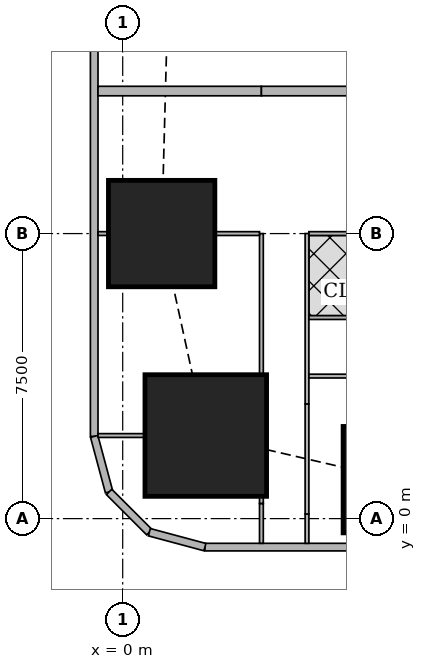
"""IFC4 building model, lengths in metres.
Left out: names, types, materials, properties, quantities, classifications, styles, units other than length and angle.
Written with IfcOpenShell. Run it as: python <this file> out.ifc"""

import sys

from ifc_helpers import new_model, si_unit, direction, frame, frame_2d, origin, origin_2d, place, context, subcontext, project, spatial, rectangle, extrude, element, fill, save


model = new_model("IFC4")
c1 = context("Model", 3, precision=1e-05, world=origin(), true_north=direction((0.0, 1.0)))
c2 = subcontext(c1, "Body", "Model", "MODEL_VIEW")
j1 = project(units=[si_unit("LENGTHUNIT", "METRE"), si_unit("PLANEANGLEUNIT", "RADIAN")], contexts=[c1])
p1 = place(None, origin())
s1 = spatial("IfcSite", under=j1, at=p1, CompositionType="ELEMENT")
p2 = place(p1, origin())
s2 = spatial("IfcBuilding", under=s1, at=p2, CompositionType="ELEMENT")
p3 = place(p2, frame((0.0, 0.0, 53.75)))
s3 = spatial("IfcBuildingStorey", under=s2, at=p3, CompositionType="ELEMENT", Elevation=53.75)
p4 = place(p3, frame((7.2, 1.025, 0.0), z_axis=(0.0, 0.0, 1.0), x_axis=(1.0, 0.0, 0.0)))
e1 = element("IfcColumn", 1, at=p4, inside=s3, PredefinedType="COLUMN", context=c2, shape_type="SweptSolid", body=[
    extrude(rectangle(XDim=2.8, YDim=2.8, at=origin_2d()), origin(), (0.0, 0.0, 1.0), 3.75),
])
p5 = place(p3, frame((2.186, 2.186, 0.0), z_axis=(0.0, 0.0, 1.0), x_axis=(1.0, 0.0, 0.0)))
e2 = element("IfcColumn", 2, at=p5, inside=s3, PredefinedType="COLUMN", context=c2, shape_type="SweptSolid", body=[
    extrude(rectangle(XDim=3.2, YDim=3.2, at=origin_2d()), origin(), (0.0, 0.0, 1.0), 3.75),
])
p6 = place(p3, frame((1.025, 7.5, 0.0), z_axis=(0.0, 0.0, 1.0), x_axis=(1.0, 0.0, 0.0)))
e3 = element("IfcColumn", 3, at=p6, inside=s3, PredefinedType="COLUMN", context=c2, shape_type="SweptSolid", body=[
    extrude(rectangle(XDim=2.8, YDim=2.8, at=origin_2d()), origin(), (0.0, 0.0, 1.0), 3.75),
])
p7 = place(p3, frame((2.163, -0.75, 0.0), z_axis=(0.0, 0.0, 1.0), x_axis=(1.0, 0.0, 0.0)))
e4 = element("IfcWall", 4, at=p7, inside=s3, PredefinedType="SOLIDWALL", context=c2, shape_type="SweptSolid", body=[
    extrude(rectangle(XDim=45.628, YDim=0.2, at=frame_2d((22.814, 0.0))), origin(), (0.0, 0.0, 1.0), 3.5),
])
p8 = place(p7, frame((9.537, 0.0, 0.9)))
e5 = element("IfcOpeningElement", 5, at=p8, cuts=e4, PredefinedType="OPENING", context=c2, shape_type="SweptSolid", body=[
    extrude(rectangle(XDim=1.8, YDim=1.5, at=frame_2d((0.9, 0.75))), frame((0.0, 0.11, 0.0), z_axis=(0.0, -1.0, 0.0), x_axis=(1.0, 0.0, 0.0)), (0.0, 0.0, 1.0), 0.22),
])
p9 = place(p7, frame((13.137, 0.0, 0.9)))
e6 = element("IfcOpeningElement", 6, at=p9, cuts=e4, PredefinedType="OPENING", context=c2, shape_type="SweptSolid", body=[
    extrude(rectangle(XDim=1.8, YDim=1.5, at=frame_2d((0.9, 0.75))), frame((0.0, 0.11, 0.0), z_axis=(0.0, -1.0, 0.0), x_axis=(1.0, 0.0, 0.0)), (0.0, 0.0, 1.0), 0.22),
])
p10 = place(p7, frame((16.737, 0.0, 0.9)))
e7 = element("IfcOpeningElement", 7, at=p10, cuts=e4, PredefinedType="OPENING", context=c2, shape_type="SweptSolid", body=[
    extrude(rectangle(XDim=1.8, YDim=1.5, at=frame_2d((0.9, 0.75))), frame((0.0, 0.11, 0.0), z_axis=(0.0, -1.0, 0.0), x_axis=(1.0, 0.0, 0.0)), (0.0, 0.0, 1.0), 0.22),
])
p11 = place(p7, frame((20.337, 0.0, 0.9)))
e8 = element("IfcOpeningElement", 8, at=p11, cuts=e4, PredefinedType="OPENING", context=c2, shape_type="SweptSolid", body=[
    extrude(rectangle(XDim=1.8, YDim=1.5, at=frame_2d((0.9, 0.75))), frame((0.0, 0.11, 0.0), z_axis=(0.0, -1.0, 0.0), x_axis=(1.0, 0.0, 0.0)), (0.0, 0.0, 1.0), 0.22),
])
p12 = place(p7, frame((23.937, 0.0, 0.9)))
e9 = element("IfcOpeningElement", 9, at=p12, cuts=e4, PredefinedType="OPENING", context=c2, shape_type="SweptSolid", body=[
    extrude(rectangle(XDim=1.8, YDim=1.5, at=frame_2d((0.9, 0.75))), frame((0.0, 0.11, 0.0), z_axis=(0.0, -1.0, 0.0), x_axis=(1.0, 0.0, 0.0)), (0.0, 0.0, 1.0), 0.22),
])
p13 = place(p7, frame((27.537, 0.0, 0.9)))
e10 = element("IfcOpeningElement", 10, at=p13, cuts=e4, PredefinedType="OPENING", context=c2, shape_type="SweptSolid", body=[
    extrude(rectangle(XDim=1.8, YDim=1.5, at=frame_2d((0.9, 0.75))), frame((0.0, 0.11, 0.0), z_axis=(0.0, -1.0, 0.0), x_axis=(1.0, 0.0, 0.0)), (0.0, 0.0, 1.0), 0.22),
])
p14 = place(p7, frame((31.137, 0.0, 0.9)))
e11 = element("IfcOpeningElement", 11, at=p14, cuts=e4, PredefinedType="OPENING", context=c2, shape_type="SweptSolid", body=[
    extrude(rectangle(XDim=1.8, YDim=1.5, at=frame_2d((0.9, 0.75))), frame((0.0, 0.11, 0.0), z_axis=(0.0, -1.0, 0.0), x_axis=(1.0, 0.0, 0.0)), (0.0, 0.0, 1.0), 0.22),
])
p15 = place(p7, frame((34.737, 0.0, 0.9)))
e12 = element("IfcOpeningElement", 12, at=p15, cuts=e4, PredefinedType="OPENING", context=c2, shape_type="SweptSolid", body=[
    extrude(rectangle(XDim=1.8, YDim=1.5, at=frame_2d((0.9, 0.75))), frame((0.0, 0.11, 0.0), z_axis=(0.0, -1.0, 0.0), x_axis=(1.0, 0.0, 0.0)), (0.0, 0.0, 1.0), 0.22),
])
p16 = place(p3, frame((-0.75, 42.837, 0.0), z_axis=(0.0, 0.0, 1.0), x_axis=(0.0, -1.0, 0.0)))
e13 = element("IfcWall", 13, at=p16, inside=s3, PredefinedType="SOLIDWALL", context=c2, shape_type="SweptSolid", body=[
    extrude(rectangle(XDim=40.674, YDim=0.2, at=frame_2d((20.337, 0.0))), origin(), (0.0, 0.0, 1.0), 3.5),
])
p17 = place(p16, frame((1.78, 0.0, 0.9)))
e14 = element("IfcOpeningElement", 14, at=p17, cuts=e13, PredefinedType="OPENING", context=c2, shape_type="SweptSolid", body=[
    extrude(rectangle(XDim=1.8, YDim=1.5, at=frame_2d((0.9, 0.75))), frame((0.0, 0.11, 0.0), z_axis=(0.0, -1.0, 0.0), x_axis=(1.0, 0.0, 0.0)), (0.0, 0.0, 1.0), 0.22),
])
p18 = place(p16, frame((6.312, 0.0, 0.9)))
e15 = element("IfcOpeningElement", 15, at=p18, cuts=e13, PredefinedType="OPENING", context=c2, shape_type="SweptSolid", body=[
    extrude(rectangle(XDim=1.8, YDim=1.5, at=frame_2d((0.9, 0.75))), frame((0.0, 0.11, 0.0), z_axis=(0.0, -1.0, 0.0), x_axis=(1.0, 0.0, 0.0)), (0.0, 0.0, 1.0), 0.22),
])
p19 = place(p16, frame((10.062, 0.0, 0.9)))
e16 = element("IfcOpeningElement", 16, at=p19, cuts=e13, PredefinedType="OPENING", context=c2, shape_type="SweptSolid", body=[
    extrude(rectangle(XDim=1.8, YDim=1.5, at=frame_2d((0.9, 0.75))), frame((0.0, 0.11, 0.0), z_axis=(0.0, -1.0, 0.0), x_axis=(1.0, 0.0, 0.0)), (0.0, 0.0, 1.0), 0.22),
])
p20 = place(p16, frame((13.812, 0.0, 0.9)))
e17 = element("IfcOpeningElement", 17, at=p20, cuts=e13, PredefinedType="OPENING", context=c2, shape_type="SweptSolid", body=[
    extrude(rectangle(XDim=1.8, YDim=1.5, at=frame_2d((0.9, 0.75))), frame((0.0, 0.11, 0.0), z_axis=(0.0, -1.0, 0.0), x_axis=(1.0, 0.0, 0.0)), (0.0, 0.0, 1.0), 0.22),
])
p21 = place(p16, frame((17.562, 0.0, 0.9)))
e18 = element("IfcOpeningElement", 18, at=p21, cuts=e13, PredefinedType="OPENING", context=c2, shape_type="SweptSolid", body=[
    extrude(rectangle(XDim=1.8, YDim=1.5, at=frame_2d((0.9, 0.75))), frame((0.0, 0.11, 0.0), z_axis=(0.0, -1.0, 0.0), x_axis=(1.0, 0.0, 0.0)), (0.0, 0.0, 1.0), 0.22),
])
p22 = place(p16, frame((21.312, 0.0, 0.9)))
e19 = element("IfcOpeningElement", 19, at=p22, cuts=e13, PredefinedType="OPENING", context=c2, shape_type="SweptSolid", body=[
    extrude(rectangle(XDim=1.8, YDim=1.5, at=frame_2d((0.9, 0.75))), frame((0.0, 0.11, 0.0), z_axis=(0.0, -1.0, 0.0), x_axis=(1.0, 0.0, 0.0)), (0.0, 0.0, 1.0), 0.22),
])
p23 = place(p16, frame((25.062, 0.0, 0.9)))
e20 = element("IfcOpeningElement", 20, at=p23, cuts=e13, PredefinedType="OPENING", context=c2, shape_type="SweptSolid", body=[
    extrude(rectangle(XDim=1.8, YDim=1.5, at=frame_2d((0.9, 0.75))), frame((0.0, 0.11, 0.0), z_axis=(0.0, -1.0, 0.0), x_axis=(1.0, 0.0, 0.0)), (0.0, 0.0, 1.0), 0.22),
])
p24 = place(p16, frame((28.812, 0.0, 0.9)))
e21 = element("IfcOpeningElement", 21, at=p24, cuts=e13, PredefinedType="OPENING", context=c2, shape_type="SweptSolid", body=[
    extrude(rectangle(XDim=1.8, YDim=1.5, at=frame_2d((0.9, 0.75))), frame((0.0, 0.11, 0.0), z_axis=(0.0, -1.0, 0.0), x_axis=(1.0, 0.0, 0.0)), (0.0, 0.0, 1.0), 0.22),
])
p25 = place(p16, frame((32.562, 0.0, 0.9)))
e22 = element("IfcOpeningElement", 22, at=p25, cuts=e13, PredefinedType="OPENING", context=c2, shape_type="SweptSolid", body=[
    extrude(rectangle(XDim=1.8, YDim=1.5, at=frame_2d((0.9, 0.75))), frame((0.0, 0.11, 0.0), z_axis=(0.0, -1.0, 0.0), x_axis=(1.0, 0.0, 0.0)), (0.0, 0.0, 1.0), 0.22),
])
p26 = place(p16, frame((37.094, 0.0, 0.9)))
e23 = element("IfcOpeningElement", 23, at=p26, cuts=e13, PredefinedType="OPENING", context=c2, shape_type="SweptSolid", body=[
    extrude(rectangle(XDim=1.8, YDim=1.5, at=frame_2d((0.9, 0.75))), frame((0.0, 0.11, 0.0), z_axis=(0.0, -1.0, 0.0), x_axis=(1.0, 0.0, 0.0)), (0.0, 0.0, 1.0), 0.22),
])
p27 = place(p3, frame((-0.75, 2.163, 0.0), z_axis=(0.0, 0.0, 1.0), x_axis=(0.259168954497, -0.965832000415, 0.0)))
e24 = element("IfcWall", 24, at=p27, inside=s3, PredefinedType="SOLIDWALL", context=c2, shape_type="SweptSolid", body=[
    extrude(rectangle(XDim=1.513, YDim=0.2, at=frame_2d((0.756, 0.0))), origin(), (0.0, 0.0, 1.0), 3.5),
])
p28 = place(p3, frame((-0.358, 0.702, 0.0), z_axis=(0.0, 0.0, 1.0), x_axis=(0.707106781187, -0.707106781187, 0.0)))
e25 = element("IfcWall", 25, at=p28, inside=s3, PredefinedType="SOLIDWALL", context=c2, shape_type="SweptSolid", body=[
    extrude(rectangle(XDim=1.499, YDim=0.2, at=frame_2d((0.75, 0.0))), origin(), (0.0, 0.0, 1.0), 3.5),
])
p29 = place(p3, frame((0.702, -0.358, 0.0), z_axis=(0.0, 0.0, 1.0), x_axis=(0.965832000415, -0.259168954497, 0.0)))
e26 = element("IfcWall", 26, at=p29, inside=s3, PredefinedType="SOLIDWALL", context=c2, shape_type="SweptSolid", body=[
    extrude(rectangle(XDim=1.513, YDim=0.2, at=frame_2d((0.756, 0.0))), origin(), (0.0, 0.0, 1.0), 3.5),
])
p30 = place(p3, frame((3.65, -0.65, 0.0), z_axis=(0.0, 0.0, 1.0), x_axis=(0.0, 1.0, 0.0)))
e27 = element("IfcWall", 27, at=p30, inside=s3, PredefinedType="PARTITIONING", context=c2, shape_type="SweptSolid", body=[
    extrude(rectangle(XDim=1.048, YDim=0.1, at=frame_2d((0.524, 0.0))), origin(), (0.0, 0.0, 1.0), 3.5),
])
p31 = place(p3, frame((3.65, 0.398, 0.0), z_axis=(0.0, 0.0, 1.0), x_axis=(0.0, 1.0, 0.0)))
e28 = element("IfcWall", 28, at=p31, inside=s3, PredefinedType="PARTITIONING", context=c2, shape_type="SweptSolid", body=[
    extrude(rectangle(XDim=0.187, YDim=0.1, at=frame_2d((0.094, 0.0))), origin(), (0.0, 0.0, 1.0), 2.05),
])
p32 = place(p3, frame((3.65, 3.787, 0.0), z_axis=(0.0, 0.0, 1.0), x_axis=(0.0, 1.0, 0.0)))
e29 = element("IfcWall", 29, at=p32, inside=s3, PredefinedType="PARTITIONING", context=c2, shape_type="SweptSolid", body=[
    extrude(rectangle(XDim=3.713, YDim=0.1, at=frame_2d((1.856, 0.0))), origin(), (0.0, 0.0, 1.0), 3.5),
])
p33 = place(p32, frame((1.4, 0.0, 0.0)))
e30 = element("IfcOpeningElement", 30, at=p33, cuts=e29, PredefinedType="OPENING", context=c2, shape_type="SweptSolid", body=[
    extrude(rectangle(XDim=0.9, YDim=2.1, at=frame_2d((0.45, 1.05))), frame((0.0, 0.06, 0.0), z_axis=(0.0, -1.0, 0.0), x_axis=(1.0, 0.0, 0.0)), (0.0, 0.0, 1.0), 0.12),
])
p34 = place(p3, frame((4.85, -0.65, 0.0), z_axis=(0.0, 0.0, 1.0), x_axis=(0.0, 1.0, 0.0)))
e31 = element("IfcWall", 31, at=p34, inside=s3, PredefinedType="PARTITIONING", context=c2, shape_type="SweptSolid", body=[
    extrude(rectangle(XDim=0.771, YDim=0.1, at=frame_2d((0.385, 0.0))), origin(), (0.0, 0.0, 1.0), 3.5),
])
p35 = place(p3, frame((4.85, 0.121, 0.0), z_axis=(0.0, 0.0, 1.0), x_axis=(0.0, 1.0, 0.0)))
e32 = element("IfcWall", 32, at=p35, inside=s3, PredefinedType="PARTITIONING", context=c2, shape_type="SweptSolid", body=[
    extrude(rectangle(XDim=2.897, YDim=0.1, at=frame_2d((1.448, 0.0))), origin(), (0.0, 0.0, 1.0), 2.05),
])
p36 = place(p3, frame((4.85, 3.018, 0.0), z_axis=(0.0, 0.0, 1.0), x_axis=(0.0, 1.0, 0.0)))
e33 = element("IfcWall", 33, at=p36, inside=s3, PredefinedType="PARTITIONING", context=c2, shape_type="SweptSolid", body=[
    extrude(rectangle(XDim=4.482, YDim=0.1, at=frame_2d((2.241, 0.0))), origin(), (0.0, 0.0, 1.0), 3.5),
])
p37 = place(p36, frame((2.927, 0.0, 0.0)))
e34 = element("IfcOpeningElement", 34, at=p37, cuts=e33, PredefinedType="OPENING", context=c2, shape_type="SweptSolid", body=[
    extrude(rectangle(XDim=0.9, YDim=2.1, at=frame_2d((0.45, 1.05))), frame((0.0, 0.06, 0.0), z_axis=(0.0, -1.0, 0.0), x_axis=(1.0, 0.0, 0.0)), (0.0, 0.0, 1.0), 0.12),
])
p38 = place(p36, frame((1.052, 0.0, 0.0)))
e35 = element("IfcOpeningElement", 35, at=p38, cuts=e33, PredefinedType="OPENING", context=c2, shape_type="SweptSolid", body=[
    extrude(rectangle(XDim=0.9, YDim=2.1, at=frame_2d((0.45, 1.05))), frame((0.0, 0.06, 0.0), z_axis=(0.0, -1.0, 0.0), x_axis=(1.0, 0.0, 0.0)), (0.0, 0.0, 1.0), 0.12),
])
p39 = place(p3, frame((-0.65, 2.186, 0.0), z_axis=(0.0, 0.0, 1.0), x_axis=(1.0, 0.0, 0.0)))
e36 = element("IfcWall", 36, at=p39, inside=s3, PredefinedType="PARTITIONING", context=c2, shape_type="SweptSolid", body=[
    extrude(rectangle(XDim=1.235, YDim=0.1, at=frame_2d((0.617, 0.0))), origin(), (0.0, 0.0, 1.0), 3.5),
])
p40 = place(p3, frame((-0.65, 7.5, 0.0), z_axis=(0.0, 0.0, 1.0), x_axis=(1.0, 0.0, 0.0)))
e37 = element("IfcWall", 37, at=p40, inside=s3, PredefinedType="PARTITIONING", context=c2, shape_type="SweptSolid", body=[
    extrude(rectangle(XDim=0.274, YDim=0.1, at=frame_2d((0.137, 0.0))), origin(), (0.0, 0.0, 1.0), 3.5),
])
p41 = place(p3, frame((2.426, 7.5, 0.0), z_axis=(0.0, 0.0, 1.0), x_axis=(1.0, 0.0, 0.0)))
e38 = element("IfcWall", 38, at=p41, inside=s3, PredefinedType="PARTITIONING", context=c2, shape_type="SweptSolid", body=[
    extrude(rectangle(XDim=1.174, YDim=0.1, at=frame_2d((0.587, 0.0))), origin(), (0.0, 0.0, 1.0), 2.05),
])
p42 = place(p3, frame((4.9, 3.75, 0.0), z_axis=(0.0, 0.0, 1.0), x_axis=(1.0, 0.0, 0.0)))
e39 = element("IfcWall", 39, at=p42, inside=s3, PredefinedType="PARTITIONING", context=c2, shape_type="SweptSolid", body=[
    extrude(rectangle(XDim=3.275, YDim=0.1, at=frame_2d((1.638, 0.0))), origin(), (0.0, 0.0, 1.0), 3.5),
])
p43 = place(p3, frame((4.9, 7.5, 0.0), z_axis=(0.0, 0.0, 1.0), x_axis=(1.0, 0.0, 0.0)))
e40 = element("IfcWall", 40, at=p43, inside=s3, PredefinedType="PARTITIONING", context=c2, shape_type="SweptSolid", body=[
    extrude(rectangle(XDim=1.399, YDim=0.1, at=frame_2d((0.7, 0.0))), origin(), (0.0, 0.0, 1.0), 3.5),
])
p44 = place(p3, frame((4.9, 5.29, 0.0), z_axis=(0.0, 0.0, 1.0), x_axis=(1.0, 0.0, 0.0)))
e41 = element("IfcWall", 41, at=p44, inside=s3, PredefinedType="PARTITIONING", context=c2, shape_type="SweptSolid", body=[
    extrude(rectangle(XDim=3.275, YDim=0.1, at=frame_2d((1.638, 0.0))), origin(), (0.0, 0.0, 1.0), 3.5),
])
p45 = place(p3, frame((-0.65, 11.25, 0.0), z_axis=(0.0, 0.0, 1.0), x_axis=(1.0, 0.0, 0.0)))
e42 = element("IfcWall", 42, at=p45, inside=s3, PredefinedType="SOLIDWALL", context=c2, shape_type="SweptSolid", body=[
    extrude(rectangle(XDim=4.3, YDim=0.25, at=frame_2d((2.15, 0.0))), origin(), (0.0, 0.0, 1.0), 2.05),
])
p46 = place(p3, frame((3.65, 11.25, 0.0), z_axis=(0.0, 0.0, 1.0), x_axis=(1.0, 0.0, 0.0)))
e43 = element("IfcWall", 43, at=p46, inside=s3, PredefinedType="SOLIDWALL", context=c2, shape_type="SweptSolid", body=[
    extrude(rectangle(XDim=4.525, YDim=0.25, at=frame_2d((2.263, 0.0))), origin(), (0.0, 0.0, 1.0), 3.5),
])
p47 = place(p24, origin())
e44 = element("IfcWindow", 44, at=p47, inside=s3, PartitioningType="SINGLE_PANEL", PredefinedType="WINDOW", context=c2, shape_type="SweptSolid", body=[
    extrude(rectangle(XDim=1.8, YDim=1.5, at=frame_2d((0.9, 0.75))), frame((0.0, 0.03, 0.0), z_axis=(0.0, -1.0, 0.0), x_axis=(1.0, 0.0, 0.0)), (0.0, 0.0, 1.0), 0.06),
])
fill(e21, e44)
p48 = place(p25, origin())
e45 = element("IfcWindow", 45, at=p48, inside=s3, PartitioningType="SINGLE_PANEL", PredefinedType="WINDOW", context=c2, shape_type="SweptSolid", body=[
    extrude(rectangle(XDim=1.8, YDim=1.5, at=frame_2d((0.9, 0.75))), frame((0.0, 0.03, 0.0), z_axis=(0.0, -1.0, 0.0), x_axis=(1.0, 0.0, 0.0)), (0.0, 0.0, 1.0), 0.06),
])
fill(e22, e45)
p49 = place(p26, origin())
e46 = element("IfcWindow", 46, at=p49, inside=s3, PartitioningType="SINGLE_PANEL", PredefinedType="WINDOW", context=c2, shape_type="SweptSolid", body=[
    extrude(rectangle(XDim=1.8, YDim=1.5, at=frame_2d((0.9, 0.75))), frame((0.0, 0.03, 0.0), z_axis=(0.0, -1.0, 0.0), x_axis=(1.0, 0.0, 0.0)), (0.0, 0.0, 1.0), 0.06),
])
fill(e23, e46)
p50 = place(p33, origin())
e47 = element("IfcDoor", 47, at=p50, inside=s3, OperationType="SINGLE_SWING_RIGHT", PredefinedType="DOOR", context=c2, shape_type="SweptSolid", body=[
    extrude(rectangle(XDim=0.9, YDim=2.1, at=frame_2d((0.45, 1.05))), frame((0.0, 0.025, 0.0), z_axis=(0.0, -1.0, 0.0), x_axis=(1.0, 0.0, 0.0)), (0.0, 0.0, 1.0), 0.05),
])
fill(e30, e47)
p51 = place(p37, origin())
e48 = element("IfcDoor", 48, at=p51, inside=s3, OperationType="SINGLE_SWING_LEFT", PredefinedType="DOOR", context=c2, shape_type="SweptSolid", body=[
    extrude(rectangle(XDim=0.9, YDim=2.1, at=frame_2d((0.45, 1.05))), frame((0.0, 0.025, 0.0), z_axis=(0.0, -1.0, 0.0), x_axis=(1.0, 0.0, 0.0)), (0.0, 0.0, 1.0), 0.05),
])
fill(e34, e48)
p52 = place(p38, origin())
e49 = element("IfcDoor", 49, at=p52, inside=s3, OperationType="SINGLE_SWING_RIGHT", PredefinedType="DOOR", context=c2, shape_type="SweptSolid", body=[
    extrude(rectangle(XDim=0.9, YDim=2.1, at=frame_2d((0.45, 1.05))), frame((0.0, 0.025, 0.0), z_axis=(0.0, -1.0, 0.0), x_axis=(1.0, 0.0, 0.0)), (0.0, 0.0, 1.0), 0.05),
])
fill(e35, e49)
save(model, sys.argv[1])
